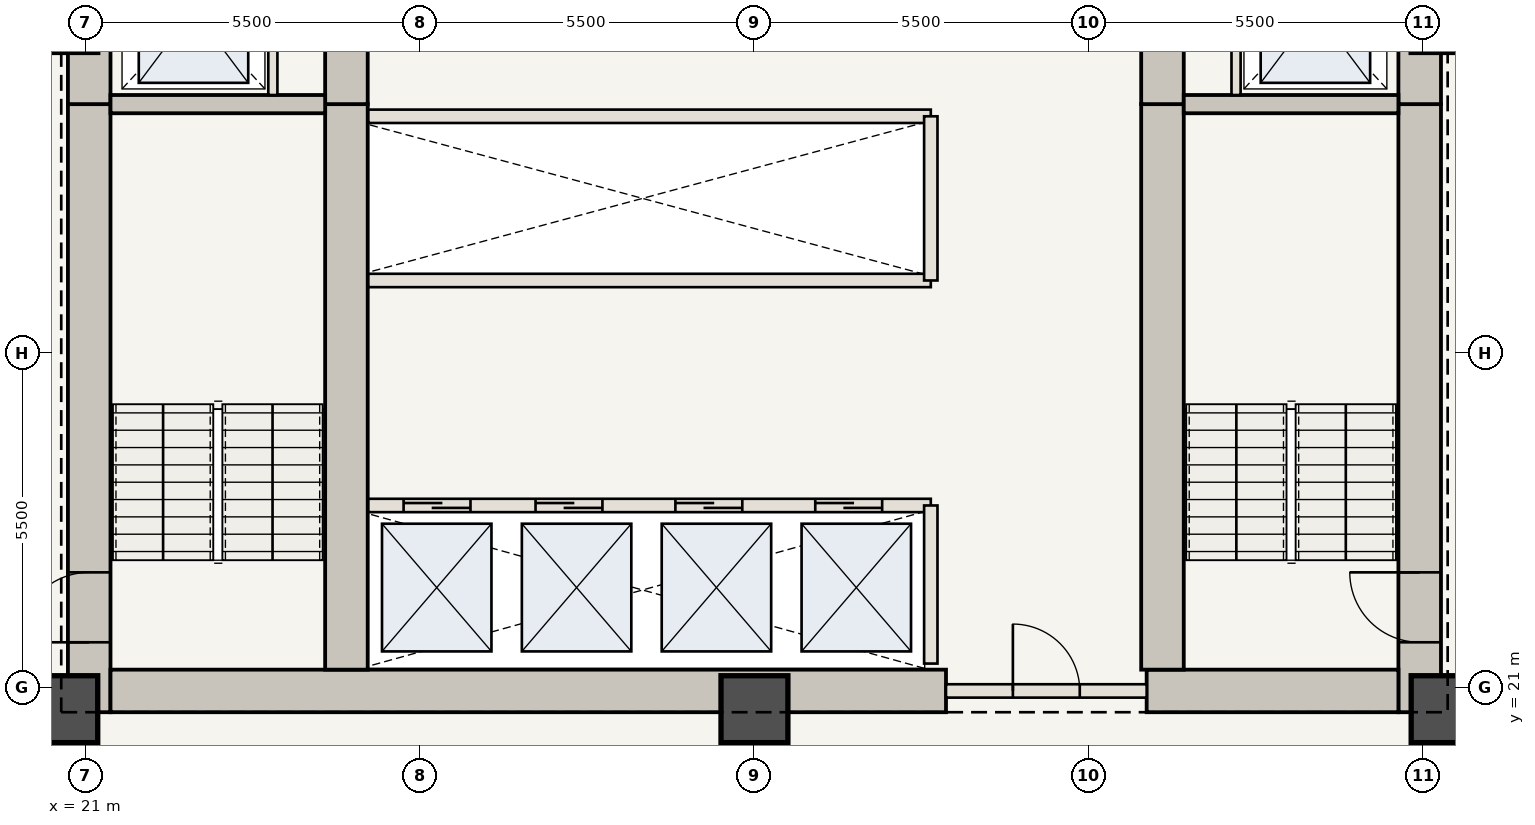
"""IFC4 building model, lengths in metres.
Left out: names, types, materials, properties, quantities, classifications, styles, units other than length and angle.
Written with IfcOpenShell. Run it as: python <this file> out.ifc"""

import sys

from ifc_helpers import new_model, si_unit, direction, frame, frame_2d, origin, origin_2d, place, context, subcontext, project, spatial, rectangle, extrude, element, fill, save


model = new_model("IFC4")
c1 = context("Model", 3, precision=1e-05, world=origin(), true_north=direction((0.0, 1.0)))
c2 = subcontext(c1, "Body", "Model", "MODEL_VIEW")
j1 = project(units=[si_unit("LENGTHUNIT", "METRE"), si_unit("PLANEANGLEUNIT", "RADIAN")], contexts=[c1])
p1 = place(None, origin())
s1 = spatial("IfcSite", under=j1, at=p1, CompositionType="ELEMENT")
p2 = place(p1, origin())
s2 = spatial("IfcBuilding", under=s1, at=p2, CompositionType="ELEMENT")
p3 = place(p2, frame((0.0, 0.0, 56.35)))
s3 = spatial("IfcBuildingStorey", under=s2, at=p3, CompositionType="ELEMENT", Elevation=56.35)
p4 = place(p3, frame((21.06, 20.6, 0.0), z_axis=(0.0, 0.0, 1.0), x_axis=(0.0, 1.0, 0.0)))
e1 = element("IfcWall", 1, at=p4, inside=s3, PredefinedType="SHEAR", context=c2, shape_type="SweptSolid", body=[
    extrude(rectangle(XDim=10.0, YDim=0.7, at=frame_2d((5.0, 0.0))), origin(), (0.0, 0.0, 1.0), 3.5),
])
p5 = place(p4, frame((1.15, 0.0, 0.0)))
e2 = element("IfcOpeningElement", 2, at=p5, cuts=e1, PredefinedType="OPENING", context=c2, shape_type="SweptSolid", body=[
    extrude(rectangle(XDim=1.15, YDim=2.15, at=frame_2d((0.575, 1.075))), frame((0.0, 0.36, 0.0), z_axis=(0.0, -1.0, 0.0), x_axis=(1.0, 0.0, 0.0)), (0.0, 0.0, 1.0), 0.72),
])
p6 = place(p3, frame((21.06, 30.6, 0.0), z_axis=(0.0, 0.0, 1.0), x_axis=(0.0, 1.0, 0.0)))
e3 = element("IfcWall", 3, at=p6, inside=s3, PredefinedType="SHEAR", context=c2, shape_type="SweptSolid", body=[
    extrude(rectangle(XDim=12.75, YDim=0.7, at=frame_2d((6.375, 0.0))), origin(), (0.0, 0.0, 1.0), 3.5),
])
p7 = place(p6, frame((4.2, 0.0, 0.0)))
e4 = element("IfcOpeningElement", 4, at=p7, cuts=e3, PredefinedType="OPENING", context=c2, shape_type="SweptSolid", body=[
    extrude(rectangle(XDim=1.1, YDim=2.15, at=frame_2d((0.55, 1.075))), frame((0.0, 0.36, 0.0), z_axis=(0.0, -1.0, 0.0), x_axis=(1.0, 0.0, 0.0)), (0.0, 0.0, 1.0), 0.72),
])
p8 = place(p6, frame((9.2, 0.0, 0.0)))
e5 = element("IfcOpeningElement", 5, at=p8, cuts=e3, PredefinedType="OPENING", context=c2, shape_type="SweptSolid", body=[
    extrude(rectangle(XDim=0.92, YDim=2.1, at=frame_2d((0.46, 1.05))), frame((0.0, 0.36, 0.0), z_axis=(0.0, -1.0, 0.0), x_axis=(1.0, 0.0, 0.0)), (0.0, 0.0, 1.0), 0.72),
])
p9 = place(p3, frame((42.94, 20.6, 0.0), z_axis=(0.0, 0.0, 1.0), x_axis=(0.0, 1.0, 0.0)))
e6 = element("IfcWall", 6, at=p9, inside=s3, PredefinedType="SHEAR", context=c2, shape_type="SweptSolid", body=[
    extrude(rectangle(XDim=10.0, YDim=0.7, at=frame_2d((5.0, 0.0))), origin(), (0.0, 0.0, 1.0), 3.5),
])
p10 = place(p9, frame((1.15, 0.0, 0.0)))
e7 = element("IfcOpeningElement", 7, at=p10, cuts=e6, PredefinedType="OPENING", context=c2, shape_type="SweptSolid", body=[
    extrude(rectangle(XDim=1.15, YDim=2.15, at=frame_2d((0.575, 1.075))), frame((0.0, 0.36, 0.0), z_axis=(0.0, -1.0, 0.0), x_axis=(1.0, 0.0, 0.0)), (0.0, 0.0, 1.0), 0.72),
])
p11 = place(p3, frame((42.94, 30.6, 0.0), z_axis=(0.0, 0.0, 1.0), x_axis=(0.0, 1.0, 0.0)))
e8 = element("IfcWall", 8, at=p11, inside=s3, PredefinedType="SHEAR", context=c2, shape_type="SweptSolid", body=[
    extrude(rectangle(XDim=12.75, YDim=0.7, at=frame_2d((6.375, 0.0))), origin(), (0.0, 0.0, 1.0), 3.5),
])
p12 = place(p11, frame((4.2, 0.0, 0.0)))
e9 = element("IfcOpeningElement", 9, at=p12, cuts=e8, PredefinedType="OPENING", context=c2, shape_type="SweptSolid", body=[
    extrude(rectangle(XDim=1.1, YDim=2.15, at=frame_2d((0.55, 1.075))), frame((0.0, 0.36, 0.0), z_axis=(0.0, -1.0, 0.0), x_axis=(1.0, 0.0, 0.0)), (0.0, 0.0, 1.0), 0.72),
])
p13 = place(p11, frame((8.4, 0.0, 0.0)))
e10 = element("IfcOpeningElement", 10, at=p13, cuts=e8, PredefinedType="OPENING", context=c2, shape_type="SweptSolid", body=[
    extrude(rectangle(XDim=0.88, YDim=2.1, at=frame_2d((0.44, 1.05))), frame((0.0, 0.36, 0.0), z_axis=(0.0, -1.0, 0.0), x_axis=(1.0, 0.0, 0.0)), (0.0, 0.0, 1.0), 0.72),
])
p14 = place(p11, frame((10.5, 0.0, 0.0)))
e11 = element("IfcOpeningElement", 11, at=p14, cuts=e8, PredefinedType="OPENING", context=c2, shape_type="SweptSolid", body=[
    extrude(rectangle(XDim=0.88, YDim=2.1, at=frame_2d((0.44, 1.05))), frame((0.0, 0.36, 0.0), z_axis=(0.0, -1.0, 0.0), x_axis=(1.0, 0.0, 0.0)), (0.0, 0.0, 1.0), 0.72),
])
p15 = place(p3, frame((21.41, 20.95, 0.0), z_axis=(0.0, 0.0, 1.0), x_axis=(1.0, 0.0, 0.0)))
e12 = element("IfcWall", 12, at=p15, inside=s3, PredefinedType="SHEAR", context=c2, shape_type="SweptSolid", body=[
    extrude(rectangle(XDim=13.74, YDim=0.7, at=frame_2d((6.87, 0.0))), origin(), (0.0, 0.0, 1.0), 3.5),
])
p16 = place(p3, frame((38.45, 20.95, 0.0), z_axis=(0.0, 0.0, 1.0), x_axis=(1.0, 0.0, 0.0)))
e13 = element("IfcWall", 13, at=p16, inside=s3, PredefinedType="SHEAR", context=c2, shape_type="SweptSolid", body=[
    extrude(rectangle(XDim=4.14, YDim=0.7, at=frame_2d((2.07, 0.0))), origin(), (0.0, 0.0, 1.0), 3.5),
])
p17 = place(p3, frame((25.29, 21.3, 0.0), z_axis=(0.0, 0.0, 1.0), x_axis=(0.0, 1.0, 0.0)))
e14 = element("IfcWall", 14, at=p17, inside=s3, PredefinedType="SHEAR", context=c2, shape_type="SweptSolid", body=[
    extrude(rectangle(XDim=9.3, YDim=0.7, at=frame_2d((4.65, 0.0))), origin(), (0.0, 0.0, 1.0), 3.5),
])
p18 = place(p3, frame((25.29, 30.6, 0.0), z_axis=(0.0, 0.0, 1.0), x_axis=(0.0, 1.0, 0.0)))
e15 = element("IfcWall", 15, at=p18, inside=s3, PredefinedType="SHEAR", context=c2, shape_type="SweptSolid", body=[
    extrude(rectangle(XDim=12.05, YDim=0.7, at=frame_2d((6.025, 0.0))), origin(), (0.0, 0.0, 1.0), 3.5),
])
p19 = place(p18, frame((6.25, 0.0, 0.0)))
e16 = element("IfcOpeningElement", 16, at=p19, cuts=e15, PredefinedType="OPENING", context=c2, shape_type="SweptSolid", body=[
    extrude(rectangle(XDim=1.1, YDim=2.15, at=frame_2d((0.55, 1.075))), frame((0.0, 0.36, 0.0), z_axis=(0.0, -1.0, 0.0), x_axis=(1.0, 0.0, 0.0)), (0.0, 0.0, 1.0), 0.72),
])
p20 = place(p3, frame((38.71, 21.3, 0.0), z_axis=(0.0, 0.0, 1.0), x_axis=(0.0, 1.0, 0.0)))
e17 = element("IfcWall", 17, at=p20, inside=s3, PredefinedType="SHEAR", context=c2, shape_type="SweptSolid", body=[
    extrude(rectangle(XDim=9.3, YDim=0.7, at=frame_2d((4.65, 0.0))), origin(), (0.0, 0.0, 1.0), 3.5),
])
p21 = place(p3, frame((38.71, 30.6, 0.0), z_axis=(0.0, 0.0, 1.0), x_axis=(0.0, 1.0, 0.0)))
e18 = element("IfcWall", 18, at=p21, inside=s3, PredefinedType="SHEAR", context=c2, shape_type="SweptSolid", body=[
    extrude(rectangle(XDim=12.05, YDim=0.7, at=frame_2d((6.025, 0.0))), origin(), (0.0, 0.0, 1.0), 3.5),
])
for number, where, z_axis, x_axis in (
    (19, (20.65, 20.65, 0.0), (0.0, 0.0, 1.0), (1.0, 0.0, 0.0)),
    (20, (32.0, 20.65, 0.0), (0.0, 0.0, 1.0), (1.0, 0.0, 0.0)),
    (21, (43.35, 20.65, 0.0), (0.0, 0.0, 1.0), (1.0, 0.0, 0.0)),
):
    element("IfcColumn", number, at=place(p3, frame(where, z_axis=z_axis, x_axis=x_axis)), inside=s3, PredefinedType="COLUMN", context=c2, shape_type="SweptSolid", body=[
        extrude(rectangle(XDim=1.1, YDim=1.1, at=origin_2d()), origin(), (0.0, 0.0, 1.0), 3.5),
    ])
for number, where, z_axis, x_axis in (
    (22, (21.41, 30.6, 0.0), (0.0, 0.0, 1.0), (1.0, 0.0, 0.0)),
    (23, (39.06, 30.6, 0.0), (0.0, 0.0, 1.0), (1.0, 0.0, 0.0)),
):
    element("IfcWall", number, at=place(p3, frame(where, z_axis=z_axis, x_axis=x_axis)), inside=s3, PredefinedType="SHEAR", context=c2, shape_type="SweptSolid", body=[
        extrude(rectangle(XDim=3.53, YDim=0.3, at=frame_2d((1.765, 0.0))), origin(), (0.0, 0.0, 1.0), 3.32),
    ])
for number, where, z_axis, x_axis in (
    (24, (24.08, 30.75, 0.0), (0.0, 0.0, 1.0), (0.0, 1.0, 0.0)),
    (25, (39.92, 30.75, 0.0), (0.0, 0.0, 1.0), (0.0, 1.0, 0.0)),
):
    element("IfcWall", number, at=place(p3, frame(where, z_axis=z_axis, x_axis=x_axis)), inside=s3, PredefinedType="STANDARD", context=c2, shape_type="SweptSolid", body=[
        extrude(rectangle(XDim=2.65, YDim=0.15, at=frame_2d((1.325, 0.0))), origin(), (0.0, 0.0, 1.0), 3.32),
    ])
p22 = place(p3, frame((35.15, 20.95, 0.0), z_axis=(0.0, 0.0, 1.0), x_axis=(1.0, 0.0, 0.0)))
e26 = element("IfcWall", 26, at=p22, inside=s3, PredefinedType="STANDARD", context=c2, shape_type="SweptSolid", body=[
    extrude(rectangle(XDim=3.3, YDim=0.22, at=frame_2d((1.65, 0.0))), origin(), (0.0, 0.0, 1.0), 3.32),
])
p23 = place(p22, frame((1.1, 0.0, 0.0)))
e27 = element("IfcOpeningElement", 27, at=p23, cuts=e26, PredefinedType="OPENING", context=c2, shape_type="SweptSolid", body=[
    extrude(rectangle(XDim=1.1, YDim=2.15, at=frame_2d((0.55, 1.075))), frame((0.0, 0.12, 0.0), z_axis=(0.0, -1.0, 0.0), x_axis=(1.0, 0.0, 0.0)), (0.0, 0.0, 1.0), 0.24),
])
p24 = place(p3, frame((25.65, 24.0, 0.0), z_axis=(0.0, 0.0, 1.0), x_axis=(1.0, 0.0, 0.0)))
e28 = element("IfcWall", 28, at=p24, inside=s3, PredefinedType="STANDARD", context=c2, shape_type="SweptSolid", body=[
    extrude(rectangle(XDim=9.25, YDim=0.22, at=frame_2d((4.625, 0.0))), origin(), (0.0, 0.0, 1.0), 3.32),
])
p25 = place(p24, frame((0.58, 0.0, 0.0)))
e29 = element("IfcOpeningElement", 29, at=p25, cuts=e28, PredefinedType="OPENING", context=c2, shape_type="SweptSolid", body=[
    extrude(rectangle(XDim=1.1, YDim=2.15, at=frame_2d((0.55, 1.075))), frame((0.0, 0.12, 0.0), z_axis=(0.0, -1.0, 0.0), x_axis=(1.0, 0.0, 0.0)), (0.0, 0.0, 1.0), 0.24),
])
p26 = place(p24, frame((2.75, 0.0, 0.0)))
e30 = element("IfcOpeningElement", 30, at=p26, cuts=e28, PredefinedType="OPENING", context=c2, shape_type="SweptSolid", body=[
    extrude(rectangle(XDim=1.1, YDim=2.15, at=frame_2d((0.55, 1.075))), frame((0.0, 0.12, 0.0), z_axis=(0.0, -1.0, 0.0), x_axis=(1.0, 0.0, 0.0)), (0.0, 0.0, 1.0), 0.24),
])
p27 = place(p24, frame((5.05, 0.0, 0.0)))
e31 = element("IfcOpeningElement", 31, at=p27, cuts=e28, PredefinedType="OPENING", context=c2, shape_type="SweptSolid", body=[
    extrude(rectangle(XDim=1.1, YDim=2.15, at=frame_2d((0.55, 1.075))), frame((0.0, 0.12, 0.0), z_axis=(0.0, -1.0, 0.0), x_axis=(1.0, 0.0, 0.0)), (0.0, 0.0, 1.0), 0.24),
])
p28 = place(p24, frame((7.35, 0.0, 0.0)))
e32 = element("IfcOpeningElement", 32, at=p28, cuts=e28, PredefinedType="OPENING", context=c2, shape_type="SweptSolid", body=[
    extrude(rectangle(XDim=1.1, YDim=2.15, at=frame_2d((0.55, 1.075))), frame((0.0, 0.12, 0.0), z_axis=(0.0, -1.0, 0.0), x_axis=(1.0, 0.0, 0.0)), (0.0, 0.0, 1.0), 0.24),
])
p29 = place(p3, frame((34.9, 21.4, 0.0), z_axis=(0.0, 0.0, 1.0), x_axis=(0.0, 1.0, 0.0)))
e33 = element("IfcWall", 33, at=p29, inside=s3, PredefinedType="STANDARD", context=c2, shape_type="SweptSolid", body=[
    extrude(rectangle(XDim=2.6, YDim=0.22, at=frame_2d((1.3, 0.0))), origin(), (0.0, 0.0, 1.0), 3.32),
])
for number, where, z_axis, x_axis in (
    (34, (25.65, 27.7, 0.0), (0.0, 0.0, 1.0), (1.0, 0.0, 0.0)),
    (35, (25.65, 30.4, 0.0), (0.0, 0.0, 1.0), (1.0, 0.0, 0.0)),
):
    element("IfcWall", number, at=place(p3, frame(where, z_axis=z_axis, x_axis=x_axis)), inside=s3, PredefinedType="STANDARD", context=c2, shape_type="SweptSolid", body=[
        extrude(rectangle(XDim=9.25, YDim=0.22, at=frame_2d((4.625, 0.0))), origin(), (0.0, 0.0, 1.0), 3.32),
    ])
p30 = place(p3, frame((34.9, 27.7, 0.0), z_axis=(0.0, 0.0, 1.0), x_axis=(0.0, 1.0, 0.0)))
e36 = element("IfcWall", 36, at=p30, inside=s3, PredefinedType="STANDARD", context=c2, shape_type="SweptSolid", body=[
    extrude(rectangle(XDim=2.7, YDim=0.22, at=frame_2d((1.35, 0.0))), origin(), (0.0, 0.0, 1.0), 3.32),
])
p31 = place(p5, origin())
e37 = element("IfcDoor", 37, at=p31, inside=s3, OperationType="SINGLE_SWING_LEFT", PredefinedType="DOOR", context=c2, shape_type="SweptSolid", body=[
    extrude(rectangle(XDim=1.15, YDim=2.15, at=frame_2d((0.575, 1.075))), frame((0.0, 0.025, 0.0), z_axis=(0.0, -1.0, 0.0), x_axis=(1.0, 0.0, 0.0)), (0.0, 0.0, 1.0), 0.05),
])
fill(e2, e37)
p32 = place(p10, origin())
e38 = element("IfcDoor", 38, at=p32, inside=s3, OperationType="SINGLE_SWING_RIGHT", PredefinedType="DOOR", context=c2, shape_type="SweptSolid", body=[
    extrude(rectangle(XDim=1.15, YDim=2.15, at=frame_2d((0.575, 1.075))), frame((0.0, 0.025, 0.0), z_axis=(0.0, -1.0, 0.0), x_axis=(1.0, 0.0, 0.0)), (0.0, 0.0, 1.0), 0.05),
])
fill(e7, e38)
p33 = place(p23, origin())
e39 = element("IfcDoor", 39, at=p33, inside=s3, OperationType="SINGLE_SWING_LEFT", PredefinedType="DOOR", context=c2, shape_type="SweptSolid", body=[
    extrude(rectangle(XDim=1.1, YDim=2.15, at=frame_2d((0.55, 1.075))), frame((0.0, 0.025, 0.0), z_axis=(0.0, -1.0, 0.0), x_axis=(1.0, 0.0, 0.0)), (0.0, 0.0, 1.0), 0.05),
])
fill(e27, e39)
p34 = place(p25, origin())
e40 = element("IfcDoor", 40, at=p34, inside=s3, OperationType="DOUBLE_DOOR_SLIDING", PredefinedType="DOOR", context=c2, shape_type="SweptSolid", body=[
    extrude(rectangle(XDim=1.1, YDim=2.15, at=frame_2d((0.55, 1.075))), frame((0.0, 0.025, 0.0), z_axis=(0.0, -1.0, 0.0), x_axis=(1.0, 0.0, 0.0)), (0.0, 0.0, 1.0), 0.05),
])
fill(e29, e40)
p35 = place(p26, origin())
e41 = element("IfcDoor", 41, at=p35, inside=s3, OperationType="DOUBLE_DOOR_SLIDING", PredefinedType="DOOR", context=c2, shape_type="SweptSolid", body=[
    extrude(rectangle(XDim=1.1, YDim=2.15, at=frame_2d((0.55, 1.075))), frame((0.0, 0.025, 0.0), z_axis=(0.0, -1.0, 0.0), x_axis=(1.0, 0.0, 0.0)), (0.0, 0.0, 1.0), 0.05),
])
fill(e30, e41)
p36 = place(p27, origin())
e42 = element("IfcDoor", 42, at=p36, inside=s3, OperationType="DOUBLE_DOOR_SLIDING", PredefinedType="DOOR", context=c2, shape_type="SweptSolid", body=[
    extrude(rectangle(XDim=1.1, YDim=2.15, at=frame_2d((0.55, 1.075))), frame((0.0, 0.025, 0.0), z_axis=(0.0, -1.0, 0.0), x_axis=(1.0, 0.0, 0.0)), (0.0, 0.0, 1.0), 0.05),
])
fill(e31, e42)
p37 = place(p28, origin())
e43 = element("IfcDoor", 43, at=p37, inside=s3, OperationType="DOUBLE_DOOR_SLIDING", PredefinedType="DOOR", context=c2, shape_type="SweptSolid", body=[
    extrude(rectangle(XDim=1.1, YDim=2.15, at=frame_2d((0.55, 1.075))), frame((0.0, 0.025, 0.0), z_axis=(0.0, -1.0, 0.0), x_axis=(1.0, 0.0, 0.0)), (0.0, 0.0, 1.0), 0.05),
])
fill(e32, e43)
save(model, sys.argv[1])
